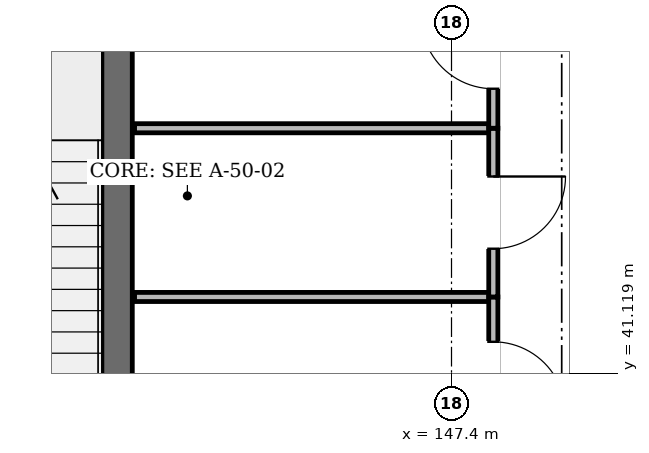
"""IFC4 building model, lengths in metres.
Left out: names, types, materials, properties, quantities, classifications, styles, units other than length and angle.
Written with IfcOpenShell. Run it as: python <this file> out.ifc"""

import sys

from ifc_helpers import new_model, si_unit, direction, frame, frame_2d, origin, place, context, subcontext, project, spatial, rectangle, extrude, element, fill, save


model = new_model("IFC4")
c1 = context("Model", 3, precision=1e-05, world=origin(), true_north=direction((0.0, 1.0)))
c2 = subcontext(c1, "Body", "Model", "MODEL_VIEW")
j1 = project(units=[si_unit("LENGTHUNIT", "METRE"), si_unit("PLANEANGLEUNIT", "RADIAN")], contexts=[c1])
p1 = place(None, origin())
s1 = spatial("IfcSite", under=j1, at=p1, CompositionType="ELEMENT")
p2 = place(p1, origin())
s2 = spatial("IfcBuilding", under=s1, at=p2, CompositionType="ELEMENT")
p3 = place(p2, frame((0.0, 0.0, 45.0)))
s3 = spatial("IfcBuildingStorey", under=s2, at=p3, CompositionType="ELEMENT", Elevation=45.0)
p4 = place(p3, frame((143.0, 39.7, 0.0), z_axis=(0.0, 0.0, 1.0), x_axis=(0.0, 1.0, 0.0)))
e1 = element("IfcWall", 1, at=p4, inside=s3, PredefinedType="SHEAR", context=c2, shape_type="SweptSolid", body=[
    extrude(rectangle(XDim=7.0, YDim=0.4, at=frame_2d((3.5, 0.0))), origin(), (0.0, 0.0, 1.0), 3.95),
])
p5 = place(p3, frame((143.23, 42.12, 0.0), z_axis=(0.0, 0.0, 1.0), x_axis=(1.0, 0.0, 0.0)))
e2 = element("IfcWall", 2, at=p5, inside=s3, PredefinedType="PARTITIONING", context=c2, shape_type="SweptSolid", body=[
    extrude(rectangle(XDim=4.72, YDim=0.12, at=frame_2d((2.36, 0.0))), origin(), (0.0, 0.0, 1.0), 3.425),
])
p6 = place(p3, frame((147.95, 42.12, 0.0), z_axis=(0.0, 0.0, 1.0), x_axis=(0.0, -1.0, 0.0)))
e3 = element("IfcWall", 3, at=p6, inside=s3, PredefinedType="PARTITIONING", context=c2, shape_type="SweptSolid", body=[
    extrude(rectangle(XDim=2.13, YDim=0.12, at=frame_2d((1.065, 0.0))), origin(), (0.0, 0.0, 1.0), 3.805),
])
p7 = place(p6, frame((0.59, 0.0, 0.0)))
e4 = element("IfcOpeningElement", 4, at=p7, cuts=e3, PredefinedType="OPENING", context=c2, shape_type="SweptSolid", body=[
    extrude(rectangle(XDim=0.95, YDim=2.15, at=frame_2d((0.475, 1.075))), frame((0.0, 0.072, 0.0), z_axis=(0.0, -1.0, 0.0), x_axis=(1.0, 0.0, 0.0)), (0.0, 0.0, 1.0), 0.144),
])
p8 = place(p3, frame((143.23, 44.34, 0.0), z_axis=(0.0, 0.0, 1.0), x_axis=(1.0, 0.0, 0.0)))
e5 = element("IfcWall", 5, at=p8, inside=s3, PredefinedType="PARTITIONING", context=c2, shape_type="SweptSolid", body=[
    extrude(rectangle(XDim=4.72, YDim=0.12, at=frame_2d((2.36, 0.0))), origin(), (0.0, 0.0, 1.0), 3.375),
])
p9 = place(p3, frame((147.95, 44.34, 0.0), z_axis=(0.0, 0.0, 1.0), x_axis=(0.0, -1.0, 0.0)))
e6 = element("IfcWall", 6, at=p9, inside=s3, PredefinedType="PARTITIONING", context=c2, shape_type="SweptSolid", body=[
    extrude(rectangle(XDim=2.22, YDim=0.12, at=frame_2d((1.11, 0.0))), origin(), (0.0, 0.0, 1.0), 3.805),
])
p10 = place(p9, frame((0.635, 0.0, 0.0)))
e7 = element("IfcOpeningElement", 7, at=p10, cuts=e6, PredefinedType="OPENING", context=c2, shape_type="SweptSolid", body=[
    extrude(rectangle(XDim=0.95, YDim=2.15, at=frame_2d((0.475, 1.075))), frame((0.0, 0.072, 0.0), z_axis=(0.0, -1.0, 0.0), x_axis=(1.0, 0.0, 0.0)), (0.0, 0.0, 1.0), 0.144),
])
p11 = place(p3, frame((147.95, 46.33, 0.0), z_axis=(0.0, 0.0, 1.0), x_axis=(0.0, -1.0, 0.0)))
e8 = element("IfcWall", 8, at=p11, inside=s3, PredefinedType="PARTITIONING", context=c2, shape_type="SweptSolid", body=[
    extrude(rectangle(XDim=1.99, YDim=0.12, at=frame_2d((0.995, 0.0))), origin(), (0.0, 0.0, 1.0), 3.805),
])
p12 = place(p11, frame((0.52, 0.0, 0.0)))
e9 = element("IfcOpeningElement", 9, at=p12, cuts=e8, PredefinedType="OPENING", context=c2, shape_type="SweptSolid", body=[
    extrude(rectangle(XDim=0.95, YDim=2.15, at=frame_2d((0.475, 1.075))), frame((0.0, 0.072, 0.0), z_axis=(0.0, -1.0, 0.0), x_axis=(1.0, 0.0, 0.0)), (0.0, 0.0, 1.0), 0.144),
])
p13 = place(p7, origin())
e10 = element("IfcDoor", 10, at=p13, inside=s3, OperationType="SINGLE_SWING_RIGHT", PredefinedType="DOOR", context=c2, shape_type="SweptSolid", body=[
    extrude(rectangle(XDim=0.95, YDim=2.15, at=frame_2d((0.475, 1.075))), frame((0.0, 0.025, 0.0), z_axis=(0.0, -1.0, 0.0), x_axis=(1.0, 0.0, 0.0)), (0.0, 0.0, 1.0), 0.05),
])
fill(e4, e10)
p14 = place(p10, origin())
e11 = element("IfcDoor", 11, at=p14, inside=s3, OperationType="SINGLE_SWING_LEFT", PredefinedType="DOOR", context=c2, shape_type="SweptSolid", body=[
    extrude(rectangle(XDim=0.95, YDim=2.15, at=frame_2d((0.475, 1.075))), frame((0.0, 0.025, 0.0), z_axis=(0.0, -1.0, 0.0), x_axis=(1.0, 0.0, 0.0)), (0.0, 0.0, 1.0), 0.05),
])
fill(e7, e11)
p15 = place(p12, frame((0.95, 0.0, 0.0), z_axis=(0.0, 0.0, 1.0), x_axis=(-1.0, 0.0, 0.0)))
e12 = element("IfcDoor", 12, at=p15, inside=s3, OperationType="SINGLE_SWING_RIGHT", PredefinedType="DOOR", context=c2, shape_type="SweptSolid", body=[
    extrude(rectangle(XDim=0.95, YDim=2.15, at=frame_2d((0.475, 1.075))), frame((0.0, 0.025, 0.0), z_axis=(0.0, -1.0, 0.0), x_axis=(1.0, 0.0, 0.0)), (0.0, 0.0, 1.0), 0.05),
])
fill(e9, e12)
save(model, sys.argv[1])
